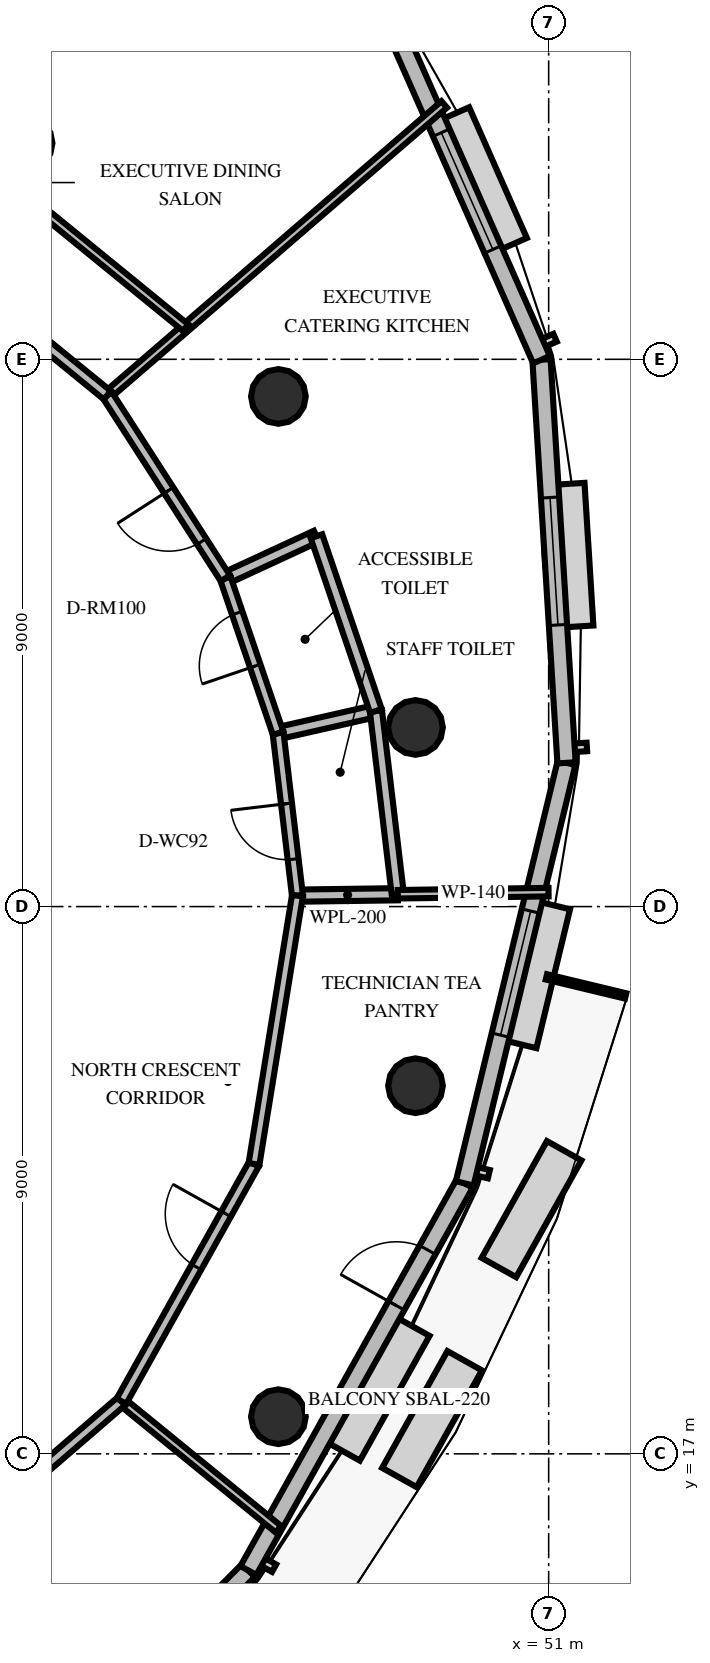
"""IFC4 building model, lengths in metres.
Left out: names, types, materials, properties, quantities, classifications, styles, units other than length and angle.
Written with IfcOpenShell. Run it as: python <this file> out.ifc"""

import sys

from ifc_helpers import new_model, si_unit, direction, frame, frame_2d, origin, origin_2d, place, context, subcontext, project, spatial, rectangle, circle, extrude, element, fill, save


model = new_model("IFC4")
c1 = context("Model", 3, precision=1e-05, world=origin(), true_north=direction((0.0, 1.0)))
c2 = subcontext(c1, "Body", "Model", "MODEL_VIEW")
j1 = project(units=[si_unit("LENGTHUNIT", "METRE"), si_unit("PLANEANGLEUNIT", "RADIAN")], contexts=[c1])
p1 = place(None, origin())
s1 = spatial("IfcSite", under=j1, at=p1, CompositionType="ELEMENT")
p2 = place(p1, origin())
s2 = spatial("IfcBuilding", under=s1, at=p2, CompositionType="ELEMENT")
p3 = place(p2, frame((0.0, 0.0, 280.8)))
s3 = spatial("IfcBuildingStorey", under=s2, at=p3, CompositionType="ELEMENT", Elevation=280.8)
for number, where, z_axis, x_axis in (
    (1, (48.81, 28.946, 0.0), (0.0, 0.0, 1.0), (1.0, 0.0, 0.0)),
    (2, (46.555, 34.389, 0.0), (0.0, 0.0, 1.0), (1.0, 0.0, 0.0)),
    (3, (46.555, 17.611, 0.0), (0.0, 0.0, 1.0), (1.0, 0.0, 0.0)),
    (4, (48.81, 23.054, 0.0), (0.0, 0.0, 1.0), (1.0, 0.0, 0.0)),
):
    element("IfcColumn", number, at=place(p3, frame(where, z_axis=z_axis, x_axis=x_axis)), inside=s3, PredefinedType="COLUMN", context=c2, shape_type="SweptSolid", body=[
        extrude(circle(Radius=0.45, at=origin_2d()), origin(), (0.0, 0.0, 1.0), 3.6),
    ])
p4 = place(p3, frame((41.049, 10.032, 0.0), z_axis=(0.0, 0.0, 1.0), x_axis=(0.704528696966, 0.709675499895, 0.0)))
e5 = element("IfcWall", 5, at=p4, inside=s3, PredefinedType="SOLIDWALL", context=c2, shape_type="SweptSolid", body=[
    extrude(rectangle(XDim=7.115, YDim=0.3, at=frame_2d((3.558, 0.0))), origin(), (0.0, 0.0, 1.0), 2.76),
])
p5 = place(p4, frame((2.508, 0.0, 0.8)))
e6 = element("IfcOpeningElement", 6, at=p5, cuts=e5, PredefinedType="OPENING", context=c2, shape_type="SweptSolid", body=[
    extrude(rectangle(XDim=2.1, YDim=1.85, at=frame_2d((1.05, 0.925))), frame((0.0, 0.16, 0.0), z_axis=(0.0, -1.0, 0.0), x_axis=(1.0, 0.0, 0.0)), (0.0, 0.0, 1.0), 0.32),
])
p6 = place(p3, frame((46.062, 15.082, 0.0), z_axis=(0.0, 0.0, 1.0), x_axis=(0.487861120846, 0.872921260348, 0.0)))
e7 = element("IfcWall", 7, at=p6, inside=s3, PredefinedType="SOLIDWALL", context=c2, shape_type="SweptSolid", body=[
    extrude(rectangle(XDim=7.293, YDim=0.3, at=frame_2d((3.646, 0.0))), origin(), (0.0, 0.0, 1.0), 2.76),
])
p7 = place(p6, frame((4.99, 0.0, 0.0)))
e8 = element("IfcOpeningElement", 8, at=p7, cuts=e7, PredefinedType="OPENING", context=c2, shape_type="SweptSolid", body=[
    extrude(rectangle(XDim=1.05, YDim=2.15, at=frame_2d((0.525, 1.075))), frame((0.0, 0.16, 0.0), z_axis=(0.0, -1.0, 0.0), x_axis=(1.0, 0.0, 0.0)), (0.0, 0.0, 1.0), 0.32),
])
p8 = place(p3, frame((49.62, 21.448, 0.0), z_axis=(0.0, 0.0, 1.0), x_axis=(0.235278882534, 0.971927902385, 0.0)))
e9 = element("IfcWall", 9, at=p8, inside=s3, PredefinedType="SOLIDWALL", context=c2, shape_type="SweptSolid", body=[
    extrude(rectangle(XDim=7.115, YDim=0.3, at=frame_2d((3.558, 0.0))), origin(), (0.0, 0.0, 1.0), 2.76),
])
p9 = place(p8, frame((2.508, 0.0, 0.8)))
e10 = element("IfcOpeningElement", 10, at=p9, cuts=e9, PredefinedType="OPENING", context=c2, shape_type="SweptSolid", body=[
    extrude(rectangle(XDim=2.1, YDim=1.85, at=frame_2d((1.05, 0.925))), frame((0.0, 0.16, 0.0), z_axis=(0.0, -1.0, 0.0), x_axis=(1.0, 0.0, 0.0)), (0.0, 0.0, 1.0), 0.32),
])
p10 = place(p3, frame((51.294, 28.364, 0.0), z_axis=(0.0, 0.0, 1.0), x_axis=(-0.06199847646, 0.99807624404, 0.0)))
e11 = element("IfcWall", 11, at=p10, inside=s3, PredefinedType="SOLIDWALL", context=c2, shape_type="SweptSolid", body=[
    extrude(rectangle(XDim=6.643, YDim=0.3, at=frame_2d((3.322, 0.0))), origin(), (0.0, 0.0, 1.0), 2.76),
])
p11 = place(p10, frame((2.272, 0.0, 0.8)))
e12 = element("IfcOpeningElement", 12, at=p11, cuts=e11, PredefinedType="OPENING", context=c2, shape_type="SweptSolid", body=[
    extrude(rectangle(XDim=2.1, YDim=1.85, at=frame_2d((1.05, 0.925))), frame((0.0, 0.16, 0.0), z_axis=(0.0, -1.0, 0.0), x_axis=(1.0, 0.0, 0.0)), (0.0, 0.0, 1.0), 0.32),
])
p12 = place(p3, frame((50.882, 34.994, 0.0), z_axis=(0.0, 0.0, 1.0), x_axis=(-0.40381273821, 0.91484166524, 0.0)))
e13 = element("IfcWall", 13, at=p12, inside=s3, PredefinedType="SOLIDWALL", context=c2, shape_type="SweptSolid", body=[
    extrude(rectangle(XDim=6.062, YDim=0.3, at=frame_2d((3.031, 0.0))), origin(), (0.0, 0.0, 1.0), 2.76),
])
p13 = place(p12, frame((1.981, 0.0, 0.8)))
e14 = element("IfcOpeningElement", 14, at=p13, cuts=e13, PredefinedType="OPENING", context=c2, shape_type="SweptSolid", body=[
    extrude(rectangle(XDim=2.1, YDim=1.85, at=frame_2d((1.05, 0.925))), frame((0.0, 0.16, 0.0), z_axis=(0.0, -1.0, 0.0), x_axis=(1.0, 0.0, 0.0)), (0.0, 0.0, 1.0), 0.32),
])
p14 = place(p3, frame((46.869, 26.18, 0.0), z_axis=(0.0, 0.0, 1.0), x_axis=(0.999903277765, 0.013908095311, 0.0)))
e15 = element("IfcWall", 15, at=p14, inside=s3, PredefinedType="PLUMBINGWALL", context=c2, shape_type="SweptSolid", body=[
    extrude(rectangle(XDim=1.65, YDim=0.2, at=frame_2d((0.825, 0.0))), origin(), (0.0, 0.0, 1.0), 2.46),
])
p15 = place(p3, frame((46.55, 28.851, 0.0), z_axis=(0.0, 0.0, 1.0), x_axis=(0.97515610781, 0.221518769862, 0.0)))
e16 = element("IfcWall", 16, at=p15, inside=s3, PredefinedType="PLUMBINGWALL", context=c2, shape_type="SweptSolid", body=[
    extrude(rectangle(XDim=1.65, YDim=0.2, at=frame_2d((0.825, 0.0))), origin(), (0.0, 0.0, 1.0), 2.46),
])
p16 = place(p3, frame((48.519, 26.203, 0.0), z_axis=(0.0, 0.0, 1.0), x_axis=(-0.118390378515, 0.992967128497, 0.0)))
e17 = element("IfcWall", 17, at=p16, inside=s3, PredefinedType="PLUMBINGWALL", context=c2, shape_type="SweptSolid", body=[
    extrude(rectangle(XDim=3.035, YDim=0.2, at=frame_2d((1.518, 0.0))), origin(), (0.0, 0.0, 1.0), 2.46),
])
p17 = place(p3, frame((46.869, 26.18, 0.0), z_axis=(0.0, 0.0, 1.0), x_axis=(-0.118325794927, 0.992974826597, 0.0)))
e18 = element("IfcWall", 18, at=p17, inside=s3, PredefinedType="PARTITIONING", context=c2, shape_type="SweptSolid", body=[
    extrude(rectangle(XDim=2.69, YDim=0.18, at=frame_2d((1.345, 0.0))), origin(), (0.0, 0.0, 1.0), 2.46),
])
p18 = place(p17, frame((0.603, 0.0, 0.0)))
e19 = element("IfcOpeningElement", 19, at=p18, cuts=e18, PredefinedType="OPENING", context=c2, shape_type="SweptSolid", body=[
    extrude(rectangle(XDim=0.92, YDim=2.1, at=frame_2d((0.46, 1.05))), frame((0.0, 0.1, 0.0), z_axis=(0.0, -1.0, 0.0), x_axis=(1.0, 0.0, 0.0)), (0.0, 0.0, 1.0), 0.2),
])
p19 = place(p3, frame((45.683, 31.398, 0.0), z_axis=(0.0, 0.0, 1.0), x_axis=(0.907764405775, 0.419480373329, 0.0)))
e20 = element("IfcWall", 20, at=p19, inside=s3, PredefinedType="PLUMBINGWALL", context=c2, shape_type="SweptSolid", body=[
    extrude(rectangle(XDim=1.65, YDim=0.2, at=frame_2d((0.825, 0.0))), origin(), (0.0, 0.0, 1.0), 2.46),
])
p20 = place(p3, frame((48.159, 29.217, 0.0), z_axis=(0.0, 0.0, 1.0), x_axis=(-0.322277599522, 0.946645207481, 0.0)))
e21 = element("IfcWall", 21, at=p20, inside=s3, PredefinedType="PLUMBINGWALL", context=c2, shape_type="SweptSolid", body=[
    extrude(rectangle(XDim=3.035, YDim=0.2, at=frame_2d((1.518, 0.0))), origin(), (0.0, 0.0, 1.0), 2.46),
])
p21 = place(p3, frame((46.55, 28.851, 0.0), z_axis=(0.0, 0.0, 1.0), x_axis=(-0.322319163372, 0.946631056391, 0.0)))
e22 = element("IfcWall", 22, at=p21, inside=s3, PredefinedType="PARTITIONING", context=c2, shape_type="SweptSolid", body=[
    extrude(rectangle(XDim=2.69, YDim=0.18, at=frame_2d((1.345, 0.0))), origin(), (0.0, 0.0, 1.0), 2.46),
])
p22 = place(p21, frame((1.167, 0.0, 0.0)))
e23 = element("IfcOpeningElement", 23, at=p22, cuts=e22, PredefinedType="OPENING", context=c2, shape_type="SweptSolid", body=[
    extrude(rectangle(XDim=0.92, YDim=2.1, at=frame_2d((0.46, 1.05))), frame((0.0, 0.1, 0.0), z_axis=(0.0, -1.0, 0.0), x_axis=(1.0, 0.0, 0.0)), (0.0, 0.0, 1.0), 0.2),
])
p23 = place(p3, frame((48.519, 26.203, 0.0), z_axis=(0.0, 0.0, 1.0), x_axis=(0.999902267808, 0.013980516151, 0.0)))
e24 = element("IfcWall", 24, at=p23, inside=s3, PredefinedType="PARTITIONING", context=c2, shape_type="SweptSolid", body=[
    extrude(rectangle(XDim=2.48, YDim=0.14, at=frame_2d((1.24, 0.0))), origin(), (0.0, 0.0, 1.0), 2.46),
])
p24 = place(p3, frame((43.742, 34.409, 0.0), z_axis=(0.0, 0.0, 1.0), x_axis=(0.756998503869, 0.65341660917, 0.0)))
e25 = element("IfcWall", 25, at=p24, inside=s3, PredefinedType="PARTITIONING", context=c2, shape_type="SweptSolid", body=[
    extrude(rectangle(XDim=7.318, YDim=0.14, at=frame_2d((3.659, 0.0))), origin(), (0.0, 0.0, 1.0), 2.46),
])
p25 = place(p3, frame((45.683, 31.398, 0.0), z_axis=(0.0, 0.0, 1.0), x_axis=(-0.54172166433, 0.840557932802, 0.0)))
e26 = element("IfcWall", 26, at=p25, inside=s3, PredefinedType="PARTITIONING", context=c2, shape_type="SweptSolid", body=[
    extrude(rectangle(XDim=3.583, YDim=0.18, at=frame_2d((1.791, 0.0))), origin(), (0.0, 0.0, 1.0), 2.46),
])
p26 = place(p25, frame((0.721, 0.0, 0.0)))
e27 = element("IfcOpeningElement", 27, at=p26, cuts=e26, PredefinedType="OPENING", context=c2, shape_type="SweptSolid", body=[
    extrude(rectangle(XDim=1.0, YDim=2.15, at=frame_2d((0.5, 1.075))), frame((0.0, 0.1, 0.0), z_axis=(0.0, -1.0, 0.0), x_axis=(1.0, 0.0, 0.0)), (0.0, 0.0, 1.0), 0.2),
])
p27 = place(p3, frame((43.742, 34.409, 0.0), z_axis=(0.0, 0.0, 1.0), x_axis=(-0.774907966297, 0.632074080919, 0.0)))
e28 = element("IfcWall", 28, at=p27, inside=s3, PredefinedType="PARTITIONING", context=c2, shape_type="SweptSolid", body=[
    extrude(rectangle(XDim=4.47, YDim=0.18, at=frame_2d((2.235, 0.0))), origin(), (0.0, 0.0, 1.0), 2.46),
])
p28 = place(p3, frame((45.029, 35.52, 0.0), z_axis=(0.0, 0.0, 1.0), x_axis=(-0.774921612032, 0.6320573512, 0.0)))
e29 = element("IfcWall", 29, at=p28, inside=s3, PredefinedType="PARTITIONING", context=c2, shape_type="SweptSolid", body=[
    extrude(rectangle(XDim=5.06, YDim=0.14, at=frame_2d((2.53, 0.0))), origin(), (0.0, 0.0, 1.0), 2.46),
])
p29 = place(p3, frame((43.973, 17.866, 0.0), z_axis=(0.0, 0.0, 1.0), x_axis=(0.774978373088, -0.631987754032, 0.0)))
e30 = element("IfcWall", 30, at=p29, inside=s3, PredefinedType="PARTITIONING", context=c2, shape_type="SweptSolid", body=[
    extrude(rectangle(XDim=3.331, YDim=0.14, at=frame_2d((1.666, 0.0))), origin(), (0.0, 0.0, 1.0), 2.46),
])
p30 = place(p3, frame((40.59, 14.945, 0.0), z_axis=(0.0, 0.0, 1.0), x_axis=(0.756992481262, 0.653423586438, 0.0)))
e31 = element("IfcWall", 31, at=p30, inside=s3, PredefinedType="PARTITIONING", context=c2, shape_type="SweptSolid", body=[
    extrude(rectangle(XDim=4.469, YDim=0.18, at=frame_2d((2.235, 0.0))), origin(), (0.0, 0.0, 1.0), 2.46),
])
p31 = place(p3, frame((43.973, 17.866, 0.0), z_axis=(0.0, 0.0, 1.0), x_axis=(0.487858082028, 0.872922958685, 0.0)))
e32 = element("IfcWall", 32, at=p31, inside=s3, PredefinedType="PARTITIONING", context=c2, shape_type="SweptSolid", body=[
    extrude(rectangle(XDim=4.47, YDim=0.18, at=frame_2d((2.235, 0.0))), origin(), (0.0, 0.0, 1.0), 2.46),
])
p32 = place(p31, frame((2.527, 0.0, 0.0)))
e33 = element("IfcOpeningElement", 33, at=p32, cuts=e32, PredefinedType="OPENING", context=c2, shape_type="SweptSolid", body=[
    extrude(rectangle(XDim=1.0, YDim=2.15, at=frame_2d((0.5, 1.075))), frame((0.0, 0.1, 0.0), z_axis=(0.0, -1.0, 0.0), x_axis=(1.0, 0.0, 0.0)), (0.0, 0.0, 1.0), 0.2),
])
p33 = place(p3, frame((46.154, 21.768, 0.0), z_axis=(0.0, 0.0, 1.0), x_axis=(0.159879840986, 0.987136483191, 0.0)))
e34 = element("IfcWall", 34, at=p33, inside=s3, PredefinedType="PARTITIONING", context=c2, shape_type="SweptSolid", body=[
    extrude(rectangle(XDim=4.469, YDim=0.18, at=frame_2d((2.235, 0.0))), origin(), (0.0, 0.0, 1.0), 2.46),
])
p34 = place(p7, origin())
e35 = element("IfcDoor", 35, at=p34, inside=s3, OperationType="SINGLE_SWING_LEFT", PredefinedType="DOOR", context=c2, shape_type="SweptSolid", body=[
    extrude(rectangle(XDim=1.05, YDim=2.15, at=frame_2d((0.525, 1.075))), frame((0.0, 0.025, 0.0), z_axis=(0.0, -1.0, 0.0), x_axis=(1.0, 0.0, 0.0)), (0.0, 0.0, 1.0), 0.05),
])
fill(e8, e35)
p35 = place(p9, origin())
e36 = element("IfcWindow", 36, at=p35, inside=s3, PartitioningType="SINGLE_PANEL", PredefinedType="WINDOW", context=c2, shape_type="SweptSolid", body=[
    extrude(rectangle(XDim=2.1, YDim=1.85, at=frame_2d((1.05, 0.925))), frame((0.0, 0.03, 0.0), z_axis=(0.0, -1.0, 0.0), x_axis=(1.0, 0.0, 0.0)), (0.0, 0.0, 1.0), 0.06),
])
fill(e10, e36)
p36 = place(p11, origin())
e37 = element("IfcWindow", 37, at=p36, inside=s3, PartitioningType="SINGLE_PANEL", PredefinedType="WINDOW", context=c2, shape_type="SweptSolid", body=[
    extrude(rectangle(XDim=2.1, YDim=1.85, at=frame_2d((1.05, 0.925))), frame((0.0, 0.03, 0.0), z_axis=(0.0, -1.0, 0.0), x_axis=(1.0, 0.0, 0.0)), (0.0, 0.0, 1.0), 0.06),
])
fill(e12, e37)
p37 = place(p13, origin())
e38 = element("IfcWindow", 38, at=p37, inside=s3, PartitioningType="SINGLE_PANEL", PredefinedType="WINDOW", context=c2, shape_type="SweptSolid", body=[
    extrude(rectangle(XDim=2.1, YDim=1.85, at=frame_2d((1.05, 0.925))), frame((0.0, 0.03, 0.0), z_axis=(0.0, -1.0, 0.0), x_axis=(1.0, 0.0, 0.0)), (0.0, 0.0, 1.0), 0.06),
])
fill(e14, e38)
p38 = place(p18, origin())
e39 = element("IfcDoor", 39, at=p38, inside=s3, OperationType="SINGLE_SWING_RIGHT", PredefinedType="DOOR", context=c2, shape_type="SweptSolid", body=[
    extrude(rectangle(XDim=0.92, YDim=2.1, at=frame_2d((0.46, 1.05))), frame((0.0, 0.025, 0.0), z_axis=(0.0, -1.0, 0.0), x_axis=(1.0, 0.0, 0.0)), (0.0, 0.0, 1.0), 0.05),
])
fill(e19, e39)
p39 = place(p22, origin())
e40 = element("IfcDoor", 40, at=p39, inside=s3, OperationType="SINGLE_SWING_LEFT", PredefinedType="DOOR", context=c2, shape_type="SweptSolid", body=[
    extrude(rectangle(XDim=0.92, YDim=2.1, at=frame_2d((0.46, 1.05))), frame((0.0, 0.025, 0.0), z_axis=(0.0, -1.0, 0.0), x_axis=(1.0, 0.0, 0.0)), (0.0, 0.0, 1.0), 0.05),
])
fill(e23, e40)
p40 = place(p26, origin())
e41 = element("IfcDoor", 41, at=p40, inside=s3, OperationType="SINGLE_SWING_RIGHT", PredefinedType="DOOR", context=c2, shape_type="SweptSolid", body=[
    extrude(rectangle(XDim=1.0, YDim=2.15, at=frame_2d((0.5, 1.075))), frame((0.0, 0.025, 0.0), z_axis=(0.0, -1.0, 0.0), x_axis=(1.0, 0.0, 0.0)), (0.0, 0.0, 1.0), 0.05),
])
fill(e27, e41)
p41 = place(p32, origin())
e42 = element("IfcDoor", 42, at=p41, inside=s3, OperationType="SINGLE_SWING_RIGHT", PredefinedType="DOOR", context=c2, shape_type="SweptSolid", body=[
    extrude(rectangle(XDim=1.0, YDim=2.15, at=frame_2d((0.5, 1.075))), frame((0.0, 0.025, 0.0), z_axis=(0.0, -1.0, 0.0), x_axis=(1.0, 0.0, 0.0)), (0.0, 0.0, 1.0), 0.05),
])
fill(e33, e42)
save(model, sys.argv[1])
